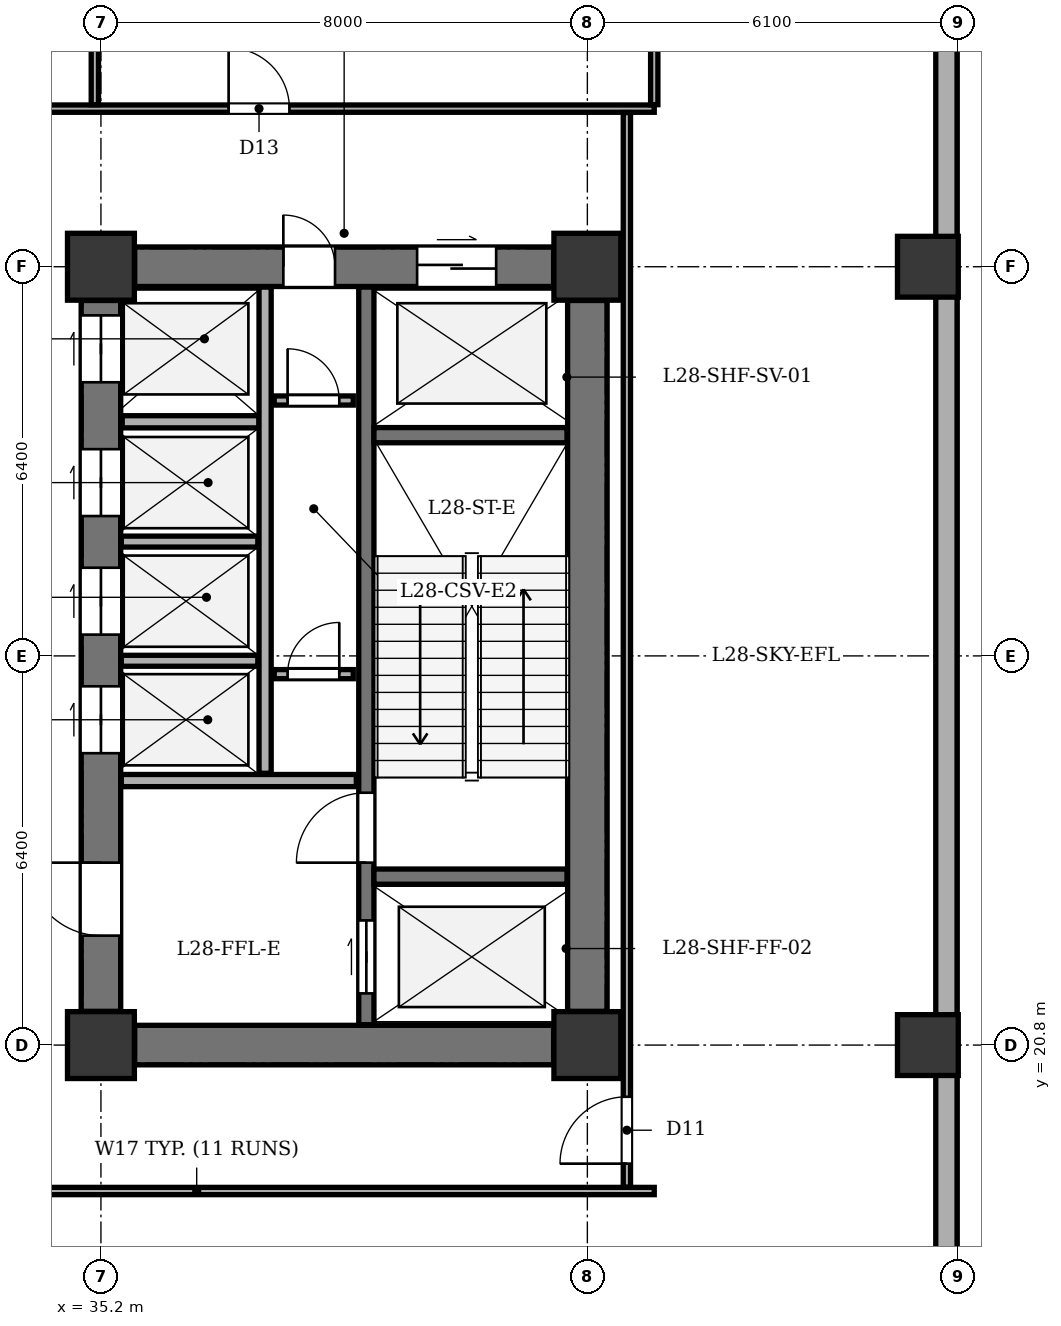
"""IFC4 building model, lengths in metres.
Left out: names, types, materials, properties, quantities, classifications, styles, units other than length and angle.
Written with IfcOpenShell. Run it as: python <this file> out.ifc"""

import sys

from ifc_helpers import new_model, si_unit, direction, frame, frame_2d, origin, origin_2d, place, context, subcontext, project, spatial, rectangle, extrude, element, fill, save


model = new_model("IFC4")
c1 = context("Model", 3, precision=1e-05, world=origin(), true_north=direction((0.0, 1.0)))
c2 = subcontext(c1, "Body", "Model", "MODEL_VIEW")
j1 = project(units=[si_unit("LENGTHUNIT", "METRE"), si_unit("PLANEANGLEUNIT", "RADIAN")], contexts=[c1])
p1 = place(None, origin())
s1 = spatial("IfcSite", under=j1, at=p1, CompositionType="ELEMENT")
p2 = place(p1, origin())
s2 = spatial("IfcBuilding", under=s1, at=p2, CompositionType="ELEMENT")
p3 = place(p2, frame((0.0, 0.0, 115.5)))
s3 = spatial("IfcBuildingStorey", under=s2, at=p3, CompositionType="ELEMENT", Elevation=115.5)
for number, where, z_axis, x_axis in (
    (1, (35.2, 20.8, 0.0), (0.0, 0.0, 1.0), (1.0, 0.0, 0.0)),
    (2, (43.2, 20.8, 0.0), (0.0, 0.0, 1.0), (1.0, 0.0, 0.0)),
    (3, (35.2, 33.6, 0.0), (0.0, 0.0, 1.0), (1.0, 0.0, 0.0)),
    (4, (43.2, 33.6, 0.0), (0.0, 0.0, 1.0), (1.0, 0.0, 0.0)),
):
    element("IfcColumn", number, at=place(p3, frame(where, z_axis=z_axis, x_axis=x_axis)), inside=s3, PredefinedType="COLUMN", context=c2, shape_type="SweptSolid", body=[
        extrude(rectangle(XDim=1.1, YDim=1.1, at=origin_2d()), origin(), (0.0, 0.0, 1.0), 4.8),
    ])
for number, where, z_axis, x_axis in (
    (5, (48.8, 20.8, 0.0), (0.0, 0.0, 1.0), (1.0, 0.0, 0.0)),
    (6, (48.8, 33.6, 0.0), (0.0, 0.0, 1.0), (1.0, 0.0, 0.0)),
):
    element("IfcColumn", number, at=place(p3, frame(where, z_axis=z_axis, x_axis=x_axis)), inside=s3, PredefinedType="COLUMN", context=c2, shape_type="SweptSolid", body=[
        extrude(rectangle(XDim=1.0, YDim=1.0, at=origin_2d()), origin(), (0.0, 0.0, 1.0), 4.8),
    ])
p4 = place(p3, frame((49.105, 47.9, 0.0), z_axis=(0.0, 0.0, 1.0), x_axis=(0.0, -1.0, 0.0)))
e7 = element("IfcWall", 7, at=p4, inside=s3, PredefinedType="STANDARD", context=c2, shape_type="SweptSolid", body=[
    extrude(rectangle(XDim=35.0, YDim=0.35, at=frame_2d((17.5, 0.0))), origin(), (0.0, 0.0, 1.0), 3.735),
])
p5 = place(p3, frame((43.2, 21.355, 0.0), z_axis=(0.0, 0.0, 1.0), x_axis=(0.0, 1.0, 0.0)))
e8 = element("IfcWall", 8, at=p5, inside=s3, PredefinedType="SHEAR", context=c2, shape_type="SweptSolid", body=[
    extrude(rectangle(XDim=11.69, YDim=0.65, at=frame_2d((5.845, 0.0))), origin(), (0.0, 0.0, 1.0), 4.35),
])
p6 = place(p3, frame((35.755, 20.8, 0.0), z_axis=(0.0, 0.0, 1.0), x_axis=(1.0, 0.0, 0.0)))
e9 = element("IfcWall", 9, at=p6, inside=s3, PredefinedType="SHEAR", context=c2, shape_type="SweptSolid", body=[
    extrude(rectangle(XDim=6.89, YDim=0.65, at=frame_2d((3.445, 0.0))), origin(), (0.0, 0.0, 1.0), 4.35),
])
p7 = place(p3, frame((35.755, 33.6, 0.0), z_axis=(0.0, 0.0, 1.0), x_axis=(1.0, 0.0, 0.0)))
e10 = element("IfcWall", 10, at=p7, inside=s3, PredefinedType="SHEAR", context=c2, shape_type="SweptSolid", body=[
    extrude(rectangle(XDim=6.89, YDim=0.65, at=frame_2d((3.445, 0.0))), origin(), (0.0, 0.0, 1.0), 4.35),
])
p8 = place(p7, frame((4.645, 0.0, 0.0)))
e11 = element("IfcOpeningElement", 11, at=p8, cuts=e10, PredefinedType="OPENING", context=c2, shape_type="SweptSolid", body=[
    extrude(rectangle(XDim=1.3, YDim=2.15, at=frame_2d((0.65, 1.075))), frame((0.0, 0.335, 0.0), z_axis=(0.0, -1.0, 0.0), x_axis=(1.0, 0.0, 0.0)), (0.0, 0.0, 1.0), 0.67),
])
p9 = place(p7, frame((2.445, 0.0, 0.0)))
e12 = element("IfcOpeningElement", 12, at=p9, cuts=e10, PredefinedType="OPENING", context=c2, shape_type="SweptSolid", body=[
    extrude(rectangle(XDim=0.85, YDim=2.02, at=frame_2d((0.425, 1.01))), frame((0.0, 0.335, 0.0), z_axis=(0.0, -1.0, 0.0), x_axis=(1.0, 0.0, 0.0)), (0.0, 0.0, 1.0), 0.67),
])
p10 = place(p3, frame((35.2, 21.355, 0.0), z_axis=(0.0, 0.0, 1.0), x_axis=(0.0, 1.0, 0.0)))
e13 = element("IfcWall", 13, at=p10, inside=s3, PredefinedType="SHEAR", context=c2, shape_type="SweptSolid", body=[
    extrude(rectangle(XDim=11.69, YDim=0.65, at=frame_2d((5.845, 0.0))), origin(), (0.0, 0.0, 1.0), 4.35),
])
p11 = place(p10, frame((1.245, 0.0, 0.0)))
e14 = element("IfcOpeningElement", 14, at=p11, cuts=e13, PredefinedType="OPENING", context=c2, shape_type="SweptSolid", body=[
    extrude(rectangle(XDim=1.2, YDim=2.15, at=frame_2d((0.6, 1.075))), frame((0.0, 0.335, 0.0), z_axis=(0.0, -1.0, 0.0), x_axis=(1.0, 0.0, 0.0)), (0.0, 0.0, 1.0), 0.67),
])
p12 = place(p10, frame((4.245, 0.0, 0.0)))
e15 = element("IfcOpeningElement", 15, at=p12, cuts=e13, PredefinedType="OPENING", context=c2, shape_type="SweptSolid", body=[
    extrude(rectangle(XDim=1.1, YDim=2.1, at=frame_2d((0.55, 1.05))), frame((0.0, 0.335, 0.0), z_axis=(0.0, -1.0, 0.0), x_axis=(1.0, 0.0, 0.0)), (0.0, 0.0, 1.0), 0.67),
])
p13 = place(p10, frame((6.195, 0.0, 0.0)))
e16 = element("IfcOpeningElement", 16, at=p13, cuts=e13, PredefinedType="OPENING", context=c2, shape_type="SweptSolid", body=[
    extrude(rectangle(XDim=1.1, YDim=2.1, at=frame_2d((0.55, 1.05))), frame((0.0, 0.335, 0.0), z_axis=(0.0, -1.0, 0.0), x_axis=(1.0, 0.0, 0.0)), (0.0, 0.0, 1.0), 0.67),
])
p14 = place(p10, frame((8.145, 0.0, 0.0)))
e17 = element("IfcOpeningElement", 17, at=p14, cuts=e13, PredefinedType="OPENING", context=c2, shape_type="SweptSolid", body=[
    extrude(rectangle(XDim=1.1, YDim=2.1, at=frame_2d((0.55, 1.05))), frame((0.0, 0.335, 0.0), z_axis=(0.0, -1.0, 0.0), x_axis=(1.0, 0.0, 0.0)), (0.0, 0.0, 1.0), 0.67),
])
p15 = place(p10, frame((10.345, 0.0, 0.0)))
e18 = element("IfcOpeningElement", 18, at=p15, cuts=e13, PredefinedType="OPENING", context=c2, shape_type="SweptSolid", body=[
    extrude(rectangle(XDim=1.1, YDim=2.1, at=frame_2d((0.55, 1.05))), frame((0.0, 0.335, 0.0), z_axis=(0.0, -1.0, 0.0), x_axis=(1.0, 0.0, 0.0)), (0.0, 0.0, 1.0), 0.67),
])
p16 = place(p3, frame((39.565, 21.135, 0.0), z_axis=(0.0, 0.0, 1.0), x_axis=(0.0, 1.0, 0.0)))
e19 = element("IfcWall", 19, at=p16, inside=s3, PredefinedType="SHEAR", context=c2, shape_type="SweptSolid", body=[
    extrude(rectangle(XDim=12.13, YDim=0.25, at=frame_2d((6.065, 0.0))), origin(), (0.0, 0.0, 1.0), 4.35),
])
p17 = place(p16, frame((0.515, 0.0, 0.0)))
e20 = element("IfcOpeningElement", 20, at=p17, cuts=e19, PredefinedType="OPENING", context=c2, shape_type="SweptSolid", body=[
    extrude(rectangle(XDim=1.2, YDim=2.15, at=frame_2d((0.6, 1.075))), frame((0.0, 0.135, 0.0), z_axis=(0.0, -1.0, 0.0), x_axis=(1.0, 0.0, 0.0)), (0.0, 0.0, 1.0), 0.27),
])
p18 = place(p16, frame((2.665, 0.0, 0.0)))
e21 = element("IfcOpeningElement", 21, at=p18, cuts=e19, PredefinedType="OPENING", context=c2, shape_type="SweptSolid", body=[
    extrude(rectangle(XDim=1.15, YDim=2.15, at=frame_2d((0.575, 1.075))), frame((0.0, 0.135, 0.0), z_axis=(0.0, -1.0, 0.0), x_axis=(1.0, 0.0, 0.0)), (0.0, 0.0, 1.0), 0.27),
])
for number, where, z_axis, x_axis in (
    (22, (39.69, 23.57, 0.0), (0.0, 0.0, 1.0), (1.0, 0.0, 0.0)),
    (23, (39.69, 30.83, 0.0), (0.0, 0.0, 1.0), (1.0, 0.0, 0.0)),
):
    element("IfcWall", number, at=place(p3, frame(where, z_axis=z_axis, x_axis=x_axis)), inside=s3, PredefinedType="SHEAR", context=c2, shape_type="SweptSolid", body=[
        extrude(rectangle(XDim=3.175, YDim=0.25, at=frame_2d((1.587, 0.0))), origin(), (0.0, 0.0, 1.0), 4.35),
    ])
p19 = place(p3, frame((35.535, 25.15, 0.0), z_axis=(0.0, 0.0, 1.0), x_axis=(1.0, 0.0, 0.0)))
e24 = element("IfcWall", 24, at=p19, inside=s3, PredefinedType="SOLIDWALL", context=c2, shape_type="SweptSolid", body=[
    extrude(rectangle(XDim=3.865, YDim=0.2, at=frame_2d((1.933, 0.0))), origin(), (0.0, 0.0, 1.0), 4.35),
])
p20 = place(p3, frame((35.55, 31.05, 0.0), z_axis=(0.0, 0.0, 1.0), x_axis=(1.0, 0.0, 0.0)))
e25 = element("IfcWall", 25, at=p20, inside=s3, PredefinedType="SOLIDWALL", context=c2, shape_type="SweptSolid", body=[
    extrude(rectangle(XDim=2.25, YDim=0.2, at=frame_2d((1.125, 0.0))), origin(), (0.0, 0.0, 1.0), 4.35),
])
p21 = place(p3, frame((37.9, 25.27, 0.0), z_axis=(0.0, 0.0, 1.0), x_axis=(0.0, 1.0, 0.0)))
e26 = element("IfcWall", 26, at=p21, inside=s3, PredefinedType="SOLIDWALL", context=c2, shape_type="SweptSolid", body=[
    extrude(rectangle(XDim=7.995, YDim=0.2, at=frame_2d((3.998, 0.0))), origin(), (0.0, 0.0, 1.0), 4.35),
])
for number, where, z_axis, x_axis in (
    (27, (35.535, 27.12, 0.0), (0.0, 0.0, 1.0), (1.0, 0.0, 0.0)),
    (28, (35.535, 29.08, 0.0), (0.0, 0.0, 1.0), (1.0, 0.0, 0.0)),
):
    element("IfcWall", number, at=place(p3, frame(where, z_axis=z_axis, x_axis=x_axis)), inside=s3, PredefinedType="PARTITIONING", context=c2, shape_type="SweptSolid", body=[
        extrude(rectangle(XDim=2.245, YDim=0.18, at=frame_2d((1.123, 0.0))), origin(), (0.0, 0.0, 1.0), 4.35),
    ])
p22 = place(p3, frame((38.05, 26.9, 0.0), z_axis=(0.0, 0.0, 1.0), x_axis=(1.0, 0.0, 0.0)))
e29 = element("IfcWall", 29, at=p22, inside=s3, PredefinedType="PARTITIONING", context=c2, shape_type="SweptSolid", body=[
    extrude(rectangle(XDim=1.3, YDim=0.15, at=frame_2d((0.65, 0.0))), origin(), (0.0, 0.0, 1.0), 4.35),
])
p23 = place(p22, frame((0.22, 0.0, 0.0)))
e30 = element("IfcOpeningElement", 30, at=p23, cuts=e29, PredefinedType="OPENING", context=c2, shape_type="SweptSolid", body=[
    extrude(rectangle(XDim=0.85, YDim=2.02, at=frame_2d((0.425, 1.01))), frame((0.0, 0.085, 0.0), z_axis=(0.0, -1.0, 0.0), x_axis=(1.0, 0.0, 0.0)), (0.0, 0.0, 1.0), 0.17),
])
p24 = place(p3, frame((38.05, 31.4, 0.0), z_axis=(0.0, 0.0, 1.0), x_axis=(1.0, 0.0, 0.0)))
e31 = element("IfcWall", 31, at=p24, inside=s3, PredefinedType="PARTITIONING", context=c2, shape_type="SweptSolid", body=[
    extrude(rectangle(XDim=1.3, YDim=0.15, at=frame_2d((0.65, 0.0))), origin(), (0.0, 0.0, 1.0), 4.35),
])
p25 = place(p24, frame((0.22, 0.0, 0.0)))
e32 = element("IfcOpeningElement", 32, at=p25, cuts=e31, PredefinedType="OPENING", context=c2, shape_type="SweptSolid", body=[
    extrude(rectangle(XDim=0.85, YDim=2.02, at=frame_2d((0.425, 1.01))), frame((0.0, 0.085, 0.0), z_axis=(0.0, -1.0, 0.0), x_axis=(1.0, 0.0, 0.0)), (0.0, 0.0, 1.0), 0.17),
])
p26 = place(p3, frame((9.3, 18.4, 0.0), z_axis=(0.0, 0.0, 1.0), x_axis=(1.0, 0.0, 0.0)))
e33 = element("IfcWall", 33, at=p26, inside=s3, PredefinedType="PARTITIONING", context=c2, shape_type="SweptSolid", body=[
    extrude(rectangle(XDim=35.0, YDim=0.12, at=frame_2d((17.5, 0.0))), origin(), (0.0, 0.0, 1.0), 4.35),
])
p27 = place(p26, frame((3.5, 0.0, 0.0)))
e34 = element("IfcOpeningElement", 34, at=p27, cuts=e33, PredefinedType="OPENING", context=c2, shape_type="SweptSolid", body=[
    extrude(rectangle(XDim=1.5, YDim=2.15, at=frame_2d((0.75, 1.075))), frame((0.0, 0.07, 0.0), z_axis=(0.0, -1.0, 0.0), x_axis=(1.0, 0.0, 0.0)), (0.0, 0.0, 1.0), 0.14),
])
p28 = place(p26, frame((18.2, 0.0, 0.0)))
e35 = element("IfcOpeningElement", 35, at=p28, cuts=e33, PredefinedType="OPENING", context=c2, shape_type="SweptSolid", body=[
    extrude(rectangle(XDim=1.4, YDim=2.15, at=frame_2d((0.7, 1.075))), frame((0.0, 0.07, 0.0), z_axis=(0.0, -1.0, 0.0), x_axis=(1.0, 0.0, 0.0)), (0.0, 0.0, 1.0), 0.14),
])
p29 = place(p3, frame((9.3, 36.2, 0.0), z_axis=(0.0, 0.0, 1.0), x_axis=(1.0, 0.0, 0.0)))
e36 = element("IfcWall", 36, at=p29, inside=s3, PredefinedType="PARTITIONING", context=c2, shape_type="SweptSolid", body=[
    extrude(rectangle(XDim=35.0, YDim=0.12, at=frame_2d((17.5, 0.0))), origin(), (0.0, 0.0, 1.0), 4.35),
])
p30 = place(p29, frame((1.3, 0.0, 0.0)))
e37 = element("IfcOpeningElement", 37, at=p30, cuts=e36, PredefinedType="OPENING", context=c2, shape_type="SweptSolid", body=[
    extrude(rectangle(XDim=0.95, YDim=2.1, at=frame_2d((0.475, 1.05))), frame((0.0, 0.07, 0.0), z_axis=(0.0, -1.0, 0.0), x_axis=(1.0, 0.0, 0.0)), (0.0, 0.0, 1.0), 0.14),
])
p31 = place(p29, frame((4.9, 0.0, 0.0)))
e38 = element("IfcOpeningElement", 38, at=p31, cuts=e36, PredefinedType="OPENING", context=c2, shape_type="SweptSolid", body=[
    extrude(rectangle(XDim=0.95, YDim=2.1, at=frame_2d((0.475, 1.05))), frame((0.0, 0.07, 0.0), z_axis=(0.0, -1.0, 0.0), x_axis=(1.0, 0.0, 0.0)), (0.0, 0.0, 1.0), 0.14),
])
p32 = place(p29, frame((8.3, 0.0, 0.0)))
e39 = element("IfcOpeningElement", 39, at=p32, cuts=e36, PredefinedType="OPENING", context=c2, shape_type="SweptSolid", body=[
    extrude(rectangle(XDim=1.0, YDim=2.1, at=frame_2d((0.5, 1.05))), frame((0.0, 0.07, 0.0), z_axis=(0.0, -1.0, 0.0), x_axis=(1.0, 0.0, 0.0)), (0.0, 0.0, 1.0), 0.14),
])
p33 = place(p29, frame((13.5, 0.0, 0.0)))
e40 = element("IfcOpeningElement", 40, at=p33, cuts=e36, PredefinedType="OPENING", context=c2, shape_type="SweptSolid", body=[
    extrude(rectangle(XDim=1.5, YDim=2.15, at=frame_2d((0.75, 1.075))), frame((0.0, 0.07, 0.0), z_axis=(0.0, -1.0, 0.0), x_axis=(1.0, 0.0, 0.0)), (0.0, 0.0, 1.0), 0.14),
])
p34 = place(p29, frame((28.0, 0.0, 0.0)))
e41 = element("IfcOpeningElement", 41, at=p34, cuts=e36, PredefinedType="OPENING", context=c2, shape_type="SweptSolid", body=[
    extrude(rectangle(XDim=1.0, YDim=2.1, at=frame_2d((0.5, 1.05))), frame((0.0, 0.07, 0.0), z_axis=(0.0, -1.0, 0.0), x_axis=(1.0, 0.0, 0.0)), (0.0, 0.0, 1.0), 0.14),
])
p35 = place(p3, frame((44.3, 36.265, 0.0), z_axis=(0.0, 0.0, 1.0), x_axis=(0.0, 1.0, 0.0)))
e42 = element("IfcWall", 42, at=p35, inside=s3, PredefinedType="PARTITIONING", context=c2, shape_type="SweptSolid", body=[
    extrude(rectangle(XDim=16.26, YDim=0.12, at=frame_2d((8.13, 0.0))), origin(), (0.0, 0.0, 1.0), 2.935),
])
p36 = place(p3, frame((35.1, 36.265, 0.0), z_axis=(0.0, 0.0, 1.0), x_axis=(0.0, 1.0, 0.0)))
e43 = element("IfcWall", 43, at=p36, inside=s3, PredefinedType="PARTITIONING", context=c2, shape_type="SweptSolid", body=[
    extrude(rectangle(XDim=16.26, YDim=0.12, at=frame_2d((8.13, 0.0))), origin(), (0.0, 0.0, 1.0), 3.535),
])
p37 = place(p3, frame((43.85, 18.465, 0.0), z_axis=(0.0, 0.0, 1.0), x_axis=(0.0, 1.0, 0.0)))
e44 = element("IfcWall", 44, at=p37, inside=s3, PredefinedType="PARTITIONING", context=c2, shape_type="SweptSolid", body=[
    extrude(rectangle(XDim=17.67, YDim=0.12, at=frame_2d((8.835, 0.0))), origin(), (0.0, 0.0, 1.0), 2.935),
])
p38 = place(p37, frame((0.385, 0.0, 0.0)))
e45 = element("IfcOpeningElement", 45, at=p38, cuts=e44, PredefinedType="OPENING", context=c2, shape_type="SweptSolid", body=[
    extrude(rectangle(XDim=1.1, YDim=2.15, at=frame_2d((0.55, 1.075))), frame((0.0, 0.07, 0.0), z_axis=(0.0, -1.0, 0.0), x_axis=(1.0, 0.0, 0.0)), (0.0, 0.0, 1.0), 0.14),
])
p39 = place(p8, origin())
e46 = element("IfcDoor", 46, at=p39, inside=s3, OperationType="DOUBLE_DOOR_SLIDING", PredefinedType="DOOR", context=c2, shape_type="SweptSolid", body=[
    extrude(rectangle(XDim=1.3, YDim=2.15, at=frame_2d((0.65, 1.075))), frame((0.0, 0.025, 0.0), z_axis=(0.0, -1.0, 0.0), x_axis=(1.0, 0.0, 0.0)), (0.0, 0.0, 1.0), 0.05),
])
fill(e11, e46)
p40 = place(p9, origin())
e47 = element("IfcDoor", 47, at=p40, inside=s3, OperationType="SINGLE_SWING_LEFT", PredefinedType="DOOR", context=c2, shape_type="SweptSolid", body=[
    extrude(rectangle(XDim=0.85, YDim=2.02, at=frame_2d((0.425, 1.01))), frame((0.0, 0.025, 0.0), z_axis=(0.0, -1.0, 0.0), x_axis=(1.0, 0.0, 0.0)), (0.0, 0.0, 1.0), 0.05),
])
fill(e12, e47)
p41 = place(p11, origin())
e48 = element("IfcDoor", 48, at=p41, inside=s3, OperationType="SINGLE_SWING_RIGHT", PredefinedType="DOOR", context=c2, shape_type="SweptSolid", body=[
    extrude(rectangle(XDim=1.2, YDim=2.15, at=frame_2d((0.6, 1.075))), frame((0.0, 0.025, 0.0), z_axis=(0.0, -1.0, 0.0), x_axis=(1.0, 0.0, 0.0)), (0.0, 0.0, 1.0), 0.05),
])
fill(e14, e48)
p42 = place(p12, origin())
e49 = element("IfcDoor", 49, at=p42, inside=s3, OperationType="DOUBLE_DOOR_SLIDING", PredefinedType="DOOR", context=c2, shape_type="SweptSolid", body=[
    extrude(rectangle(XDim=1.1, YDim=2.1, at=frame_2d((0.55, 1.05))), frame((0.0, 0.025, 0.0), z_axis=(0.0, -1.0, 0.0), x_axis=(1.0, 0.0, 0.0)), (0.0, 0.0, 1.0), 0.05),
])
fill(e15, e49)
p43 = place(p13, origin())
e50 = element("IfcDoor", 50, at=p43, inside=s3, OperationType="DOUBLE_DOOR_SLIDING", PredefinedType="DOOR", context=c2, shape_type="SweptSolid", body=[
    extrude(rectangle(XDim=1.1, YDim=2.1, at=frame_2d((0.55, 1.05))), frame((0.0, 0.025, 0.0), z_axis=(0.0, -1.0, 0.0), x_axis=(1.0, 0.0, 0.0)), (0.0, 0.0, 1.0), 0.05),
])
fill(e16, e50)
p44 = place(p14, origin())
e51 = element("IfcDoor", 51, at=p44, inside=s3, OperationType="DOUBLE_DOOR_SLIDING", PredefinedType="DOOR", context=c2, shape_type="SweptSolid", body=[
    extrude(rectangle(XDim=1.1, YDim=2.1, at=frame_2d((0.55, 1.05))), frame((0.0, 0.025, 0.0), z_axis=(0.0, -1.0, 0.0), x_axis=(1.0, 0.0, 0.0)), (0.0, 0.0, 1.0), 0.05),
])
fill(e17, e51)
p45 = place(p15, origin())
e52 = element("IfcDoor", 52, at=p45, inside=s3, OperationType="DOUBLE_DOOR_SLIDING", PredefinedType="DOOR", context=c2, shape_type="SweptSolid", body=[
    extrude(rectangle(XDim=1.1, YDim=2.1, at=frame_2d((0.55, 1.05))), frame((0.0, 0.025, 0.0), z_axis=(0.0, -1.0, 0.0), x_axis=(1.0, 0.0, 0.0)), (0.0, 0.0, 1.0), 0.05),
])
fill(e18, e52)
p46 = place(p17, origin())
e53 = element("IfcDoor", 53, at=p46, inside=s3, OperationType="DOUBLE_DOOR_SLIDING", PredefinedType="DOOR", context=c2, shape_type="SweptSolid", body=[
    extrude(rectangle(XDim=1.2, YDim=2.15, at=frame_2d((0.6, 1.075))), frame((0.0, 0.025, 0.0), z_axis=(0.0, -1.0, 0.0), x_axis=(1.0, 0.0, 0.0)), (0.0, 0.0, 1.0), 0.05),
])
fill(e20, e53)
p47 = place(p18, origin())
e54 = element("IfcDoor", 54, at=p47, inside=s3, OperationType="SINGLE_SWING_LEFT", PredefinedType="DOOR", context=c2, shape_type="SweptSolid", body=[
    extrude(rectangle(XDim=1.15, YDim=2.15, at=frame_2d((0.575, 1.075))), frame((0.0, 0.025, 0.0), z_axis=(0.0, -1.0, 0.0), x_axis=(1.0, 0.0, 0.0)), (0.0, 0.0, 1.0), 0.05),
])
fill(e21, e54)
p48 = place(p23, origin())
e55 = element("IfcDoor", 55, at=p48, inside=s3, OperationType="SINGLE_SWING_RIGHT", PredefinedType="DOOR", context=c2, shape_type="SweptSolid", body=[
    extrude(rectangle(XDim=0.85, YDim=2.02, at=frame_2d((0.425, 1.01))), frame((0.0, 0.025, 0.0), z_axis=(0.0, -1.0, 0.0), x_axis=(1.0, 0.0, 0.0)), (0.0, 0.0, 1.0), 0.05),
])
fill(e30, e55)
p49 = place(p25, origin())
e56 = element("IfcDoor", 56, at=p49, inside=s3, OperationType="SINGLE_SWING_LEFT", PredefinedType="DOOR", context=c2, shape_type="SweptSolid", body=[
    extrude(rectangle(XDim=0.85, YDim=2.02, at=frame_2d((0.425, 1.01))), frame((0.0, 0.025, 0.0), z_axis=(0.0, -1.0, 0.0), x_axis=(1.0, 0.0, 0.0)), (0.0, 0.0, 1.0), 0.05),
])
fill(e32, e56)
p50 = place(p34, origin())
e57 = element("IfcDoor", 57, at=p50, inside=s3, OperationType="SINGLE_SWING_LEFT", PredefinedType="DOOR", context=c2, shape_type="SweptSolid", body=[
    extrude(rectangle(XDim=1.0, YDim=2.1, at=frame_2d((0.5, 1.05))), frame((0.0, 0.025, 0.0), z_axis=(0.0, -1.0, 0.0), x_axis=(1.0, 0.0, 0.0)), (0.0, 0.0, 1.0), 0.05),
])
fill(e41, e57)
p51 = place(p38, origin())
e58 = element("IfcDoor", 58, at=p51, inside=s3, OperationType="SINGLE_SWING_LEFT", PredefinedType="DOOR", context=c2, shape_type="SweptSolid", body=[
    extrude(rectangle(XDim=1.1, YDim=2.15, at=frame_2d((0.55, 1.075))), frame((0.0, 0.025, 0.0), z_axis=(0.0, -1.0, 0.0), x_axis=(1.0, 0.0, 0.0)), (0.0, 0.0, 1.0), 0.05),
])
fill(e45, e58)
save(model, sys.argv[1])
